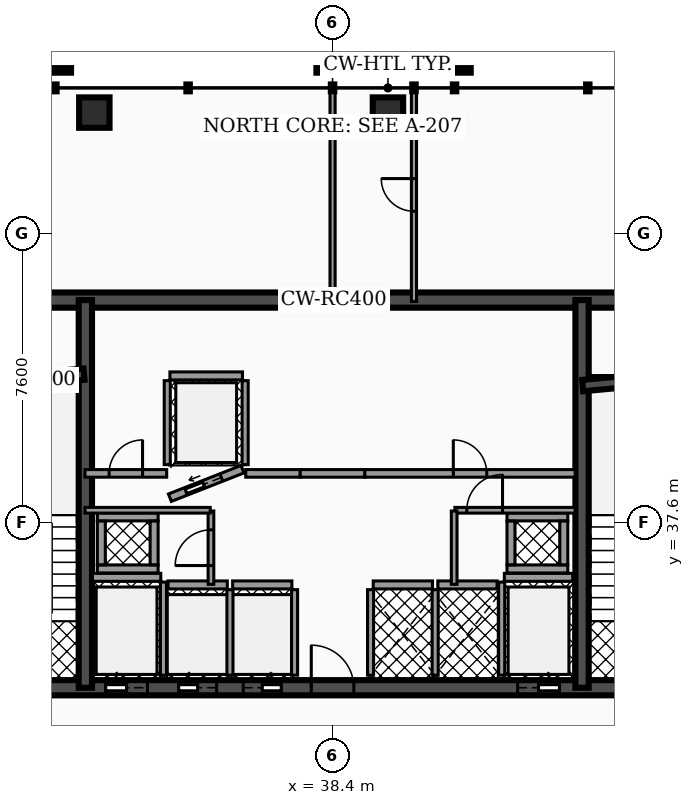
"""IFC4 building model, lengths in metres.
Left out: names, types, materials, properties, quantities, classifications, styles, units other than length and angle.
Written with IfcOpenShell. Run it as: python <this file> out.ifc"""

import sys

from ifc_helpers import new_model, si_unit, direction, frame, frame_2d, origin, origin_2d, place, context, subcontext, project, spatial, rectangle, hollow_rectangle, extrude, element, fill, save


model = new_model("IFC4")
c1 = context("Model", 3, precision=1e-05, world=origin(), true_north=direction((0.0, 1.0)))
c2 = subcontext(c1, "Body", "Model", "MODEL_VIEW")
j1 = project(units=[si_unit("LENGTHUNIT", "METRE"), si_unit("PLANEANGLEUNIT", "RADIAN")], contexts=[c1])
p1 = place(None, origin())
s1 = spatial("IfcSite", under=j1, at=p1, CompositionType="ELEMENT")
p2 = place(p1, origin())
s2 = spatial("IfcBuilding", under=s1, at=p2, CompositionType="ELEMENT")
p3 = place(p2, frame((0.0, 0.0, 145.86)))
s3 = spatial("IfcBuildingStorey", under=s2, at=p3, CompositionType="ELEMENT", Elevation=145.86)
p4 = place(p3, frame((28.4, 43.45, 0.0), z_axis=(0.0, 0.0, 1.0), x_axis=(1.0, 0.0, 0.0)))
e1 = element("IfcWall", 1, at=p4, inside=s3, PredefinedType="SHEAR", context=c2, shape_type="SweptSolid", body=[
    extrude(rectangle(XDim=20.06, YDim=0.4, at=frame_2d((10.03, 0.0))), origin(), (0.0, 0.0, 1.0), 3.5),
])
p5 = place(p3, frame((28.4, 33.25, 0.0), z_axis=(0.0, 0.0, 1.0), x_axis=(1.0, 0.0, 0.0)))
e2 = element("IfcWall", 2, at=p5, inside=s3, PredefinedType="SHEAR", context=c2, shape_type="SweptSolid", body=[
    extrude(rectangle(XDim=20.06, YDim=0.4, at=frame_2d((10.03, 0.0))), origin(), (0.0, 0.0, 1.0), 3.5),
])
p6 = place(p5, frame((4.03, 0.0, 0.0)))
e3 = element("IfcOpeningElement", 3, at=p6, cuts=e2, PredefinedType="OPENING", context=c2, shape_type="SweptSolid", body=[
    extrude(rectangle(XDim=1.1, YDim=2.15, at=frame_2d((0.55, 1.075))), frame((0.0, 0.21, 0.0), z_axis=(0.0, -1.0, 0.0), x_axis=(1.0, 0.0, 0.0)), (0.0, 0.0, 1.0), 0.42),
])
p7 = place(p5, frame((14.87, 0.0, 0.0)))
e4 = element("IfcOpeningElement", 4, at=p7, cuts=e2, PredefinedType="OPENING", context=c2, shape_type="SweptSolid", body=[
    extrude(rectangle(XDim=1.1, YDim=2.15, at=frame_2d((0.55, 1.075))), frame((0.0, 0.21, 0.0), z_axis=(0.0, -1.0, 0.0), x_axis=(1.0, 0.0, 0.0)), (0.0, 0.0, 1.0), 0.42),
])
p8 = place(p5, frame((5.95, 0.0, 0.0)))
e5 = element("IfcOpeningElement", 5, at=p8, cuts=e2, PredefinedType="OPENING", context=c2, shape_type="SweptSolid", body=[
    extrude(rectangle(XDim=1.0, YDim=2.1, at=frame_2d((0.5, 1.05))), frame((0.0, 0.21, 0.0), z_axis=(0.0, -1.0, 0.0), x_axis=(1.0, 0.0, 0.0)), (0.0, 0.0, 1.0), 0.42),
])
p9 = place(p5, frame((7.65, 0.0, 0.0)))
e6 = element("IfcOpeningElement", 6, at=p9, cuts=e2, PredefinedType="OPENING", context=c2, shape_type="SweptSolid", body=[
    extrude(rectangle(XDim=1.0, YDim=2.1, at=frame_2d((0.5, 1.05))), frame((0.0, 0.21, 0.0), z_axis=(0.0, -1.0, 0.0), x_axis=(1.0, 0.0, 0.0)), (0.0, 0.0, 1.0), 0.42),
])
p10 = place(p5, frame((1.31, 0.0, 0.0)))
e7 = element("IfcOpeningElement", 7, at=p10, cuts=e2, PredefinedType="OPENING", context=c2, shape_type="SweptSolid", body=[
    extrude(rectangle(XDim=1.1, YDim=2.2, at=frame_2d((0.55, 1.1))), frame((0.0, 0.21, 0.0), z_axis=(0.0, -1.0, 0.0), x_axis=(1.0, 0.0, 0.0)), (0.0, 0.0, 1.0), 0.42),
])
p11 = place(p5, frame((9.44, 0.0, 0.0)))
e8 = element("IfcOpeningElement", 8, at=p11, cuts=e2, PredefinedType="OPENING", context=c2, shape_type="SweptSolid", body=[
    extrude(rectangle(XDim=1.12, YDim=2.05, at=frame_2d((0.56, 1.025))), frame((0.0, 0.21, 0.0), z_axis=(0.0, -1.0, 0.0), x_axis=(1.0, 0.0, 0.0)), (0.0, 0.0, 1.0), 0.42),
])
p12 = place(p5, frame((17.65, 0.0, 0.0)))
e9 = element("IfcOpeningElement", 9, at=p12, cuts=e2, PredefinedType="OPENING", context=c2, shape_type="SweptSolid", body=[
    extrude(rectangle(XDim=1.1, YDim=2.2, at=frame_2d((0.55, 1.1))), frame((0.0, 0.21, 0.0), z_axis=(0.0, -1.0, 0.0), x_axis=(1.0, 0.0, 0.0)), (0.0, 0.0, 1.0), 0.42),
])
for number, where, z_axis, x_axis in (
    (10, (31.895, 33.25, 0.0), (0.0, 0.0, 1.0), (0.0, 1.0, 0.0)),
    (11, (44.965, 33.25, 0.0), (0.0, 0.0, 1.0), (0.0, 1.0, 0.0)),
):
    element("IfcWall", number, at=place(p3, frame(where, z_axis=z_axis, x_axis=x_axis)), inside=s3, PredefinedType="SHEAR", context=c2, shape_type="SweptSolid", body=[
        extrude(rectangle(XDim=10.2, YDim=0.35, at=frame_2d((5.1, 0.0))), origin(), (0.0, 0.0, 1.0), 3.5),
    ])
p13 = place(p3, frame((28.64, 41.2, 0.0), z_axis=(0.0, 0.0, 1.0), x_axis=(0.995687118776, 0.092774789157, 0.0)))
e12 = element("IfcWall", 12, at=p13, inside=s3, PredefinedType="SHEAR", context=c2, shape_type="SweptSolid", body=[
    extrude(rectangle(XDim=3.234, YDim=0.3, at=frame_2d((1.617, 0.0))), origin(), (0.0, 0.0, 1.0), 3.5),
])
p14 = place(p3, frame((44.98, 41.2, 0.0), z_axis=(0.0, 0.0, 1.0), x_axis=(0.995686468965, 0.09278176286, 0.0)))
e13 = element("IfcWall", 13, at=p14, inside=s3, PredefinedType="SHEAR", context=c2, shape_type="SweptSolid", body=[
    extrude(rectangle(XDim=3.234, YDim=0.3, at=frame_2d((1.617, 0.0))), origin(), (0.0, 0.0, 1.0), 3.5),
])
for number, where, z_axis, x_axis in (
    (14, (39.857, 48.383, 0.0), (0.0, 0.0, 1.0), (1.0, 0.0, 0.0)),
    (15, (32.131, 48.383, 0.0), (0.0, 0.0, 1.0), (1.0, 0.0, 0.0)),
):
    element("IfcColumn", number, at=place(p3, frame(where, z_axis=z_axis, x_axis=x_axis)), inside=s3, PredefinedType="COLUMN", context=c2, shape_type="SweptSolid", body=[
        extrude(hollow_rectangle(XDim=0.8, YDim=0.8, WallThickness=0.04, at=origin_2d()), origin(), (0.0, 0.0, 1.0), 3.5),
    ])
p15 = place(p3, frame((32.08, 36.155, 0.0), z_axis=(0.0, 0.0, 1.0), x_axis=(1.0, 0.0, 0.0)))
e16 = element("IfcWall", 16, at=p15, inside=s3, PredefinedType="SOLIDWALL", context=c2, shape_type="SweptSolid", body=[
    extrude(rectangle(XDim=1.8, YDim=0.21, at=frame_2d((0.9, 0.0))), origin(), (0.0, 0.0, 1.0), 2.472),
])
p16 = place(p3, frame((33.95, 33.58, 0.0), z_axis=(0.0, 0.0, 1.0), x_axis=(0.0, 1.0, 0.0)))
e17 = element("IfcWall", 17, at=p16, inside=s3, PredefinedType="SOLIDWALL", context=c2, shape_type="SweptSolid", body=[
    extrude(rectangle(XDim=2.45, YDim=0.16, at=frame_2d((1.225, 0.0))), origin(), (0.0, 0.0, 1.0), 2.472),
])
p17 = place(p3, frame((42.92, 36.155, 0.0), z_axis=(0.0, 0.0, 1.0), x_axis=(1.0, 0.0, 0.0)))
e18 = element("IfcWall", 18, at=p17, inside=s3, PredefinedType="SOLIDWALL", context=c2, shape_type="SweptSolid", body=[
    extrude(rectangle(XDim=1.8, YDim=0.21, at=frame_2d((0.9, 0.0))), origin(), (0.0, 0.0, 1.0), 2.472),
])
p18 = place(p3, frame((42.85, 33.58, 0.0), z_axis=(0.0, 0.0, 1.0), x_axis=(0.0, 1.0, 0.0)))
e19 = element("IfcWall", 19, at=p18, inside=s3, PredefinedType="SOLIDWALL", context=c2, shape_type="SweptSolid", body=[
    extrude(rectangle(XDim=2.45, YDim=0.16, at=frame_2d((1.225, 0.0))), origin(), (0.0, 0.0, 1.0), 2.472),
])
p19 = place(p3, frame((34.07, 35.955, 0.0), z_axis=(0.0, 0.0, 1.0), x_axis=(1.0, 0.0, 0.0)))
e20 = element("IfcWall", 20, at=p19, inside=s3, PredefinedType="SOLIDWALL", context=c2, shape_type="SweptSolid", body=[
    extrude(rectangle(XDim=1.56, YDim=0.21, at=frame_2d((0.78, 0.0))), origin(), (0.0, 0.0, 1.0), 2.472),
])
p20 = place(p3, frame((35.7, 33.58, 0.0), z_axis=(0.0, 0.0, 1.0), x_axis=(0.0, 1.0, 0.0)))
e21 = element("IfcWall", 21, at=p20, inside=s3, PredefinedType="SOLIDWALL", context=c2, shape_type="SweptSolid", body=[
    extrude(rectangle(XDim=2.25, YDim=0.16, at=frame_2d((1.125, 0.0))), origin(), (0.0, 0.0, 1.0), 2.472),
])
p21 = place(p3, frame((35.77, 35.955, 0.0), z_axis=(0.0, 0.0, 1.0), x_axis=(1.0, 0.0, 0.0)))
e22 = element("IfcWall", 22, at=p21, inside=s3, PredefinedType="SOLIDWALL", context=c2, shape_type="SweptSolid", body=[
    extrude(rectangle(XDim=1.56, YDim=0.21, at=frame_2d((0.78, 0.0))), origin(), (0.0, 0.0, 1.0), 2.472),
])
p22 = place(p3, frame((37.4, 33.58, 0.0), z_axis=(0.0, 0.0, 1.0), x_axis=(0.0, 1.0, 0.0)))
e23 = element("IfcWall", 23, at=p22, inside=s3, PredefinedType="SOLIDWALL", context=c2, shape_type="SweptSolid", body=[
    extrude(rectangle(XDim=2.25, YDim=0.16, at=frame_2d((1.125, 0.0))), origin(), (0.0, 0.0, 1.0), 2.472),
])
p23 = place(p3, frame((34.12, 38.25, 0.0), z_axis=(0.0, 0.0, 1.0), x_axis=(0.930804993012, 0.36551616241, 0.0)))
e24 = element("IfcWall", 24, at=p23, inside=s3, PredefinedType="SOLIDWALL", context=c2, shape_type="SweptSolid", body=[
    extrude(rectangle(XDim=2.052, YDim=0.21, at=frame_2d((1.026, 0.0))), origin(), (0.0, 0.0, 1.0), 2.472),
])
p24 = place(p23, frame((0.455, 0.0, 0.0)))
e25 = element("IfcOpeningElement", 25, at=p24, cuts=e24, PredefinedType="OPENING", context=c2, shape_type="SweptSolid", body=[
    extrude(rectangle(XDim=1.0, YDim=2.1, at=frame_2d((0.5, 1.05))), frame((0.0, 0.115, 0.0), z_axis=(0.0, -1.0, 0.0), x_axis=(1.0, 0.0, 0.0)), (0.0, 0.0, 1.0), 0.23),
])
p25 = place(p3, frame((34.12, 41.455, 0.0), z_axis=(0.0, 0.0, 1.0), x_axis=(1.0, 0.0, 0.0)))
e26 = element("IfcWall", 26, at=p25, inside=s3, PredefinedType="SOLIDWALL", context=c2, shape_type="SweptSolid", body=[
    extrude(rectangle(XDim=1.91, YDim=0.21, at=frame_2d((0.955, 0.0))), origin(), (0.0, 0.0, 1.0), 2.472),
])
for number, where, z_axis, x_axis in (
    (27, (34.05, 39.12, 0.0), (0.0, 0.0, 1.0), (0.0, 1.0, 0.0)),
    (28, (36.1, 39.12, 0.0), (0.0, 0.0, 1.0), (0.0, 1.0, 0.0)),
):
    element("IfcWall", number, at=place(p3, frame(where, z_axis=z_axis, x_axis=x_axis)), inside=s3, PredefinedType="SOLIDWALL", context=c2, shape_type="SweptSolid", body=[
        extrude(rectangle(XDim=2.21, YDim=0.16, at=frame_2d((1.105, 0.0))), origin(), (0.0, 0.0, 1.0), 2.472),
    ])
p26 = place(p3, frame((39.47, 35.955, 0.0), z_axis=(0.0, 0.0, 1.0), x_axis=(1.0, 0.0, 0.0)))
e29 = element("IfcWall", 29, at=p26, inside=s3, PredefinedType="SOLIDWALL", context=c2, shape_type="SweptSolid", body=[
    extrude(rectangle(XDim=1.56, YDim=0.21, at=frame_2d((0.78, 0.0))), origin(), (0.0, 0.0, 1.0), 2.472),
])
for number, where, z_axis, x_axis in (
    (30, (39.4, 33.58, 0.0), (0.0, 0.0, 1.0), (0.0, 1.0, 0.0)),
    (31, (41.1, 33.58, 0.0), (0.0, 0.0, 1.0), (0.0, 1.0, 0.0)),
):
    element("IfcWall", number, at=place(p3, frame(where, z_axis=z_axis, x_axis=x_axis)), inside=s3, PredefinedType="SOLIDWALL", context=c2, shape_type="SweptSolid", body=[
        extrude(rectangle(XDim=2.25, YDim=0.16, at=frame_2d((1.125, 0.0))), origin(), (0.0, 0.0, 1.0), 2.472),
    ])
p27 = place(p3, frame((41.17, 35.955, 0.0), z_axis=(0.0, 0.0, 1.0), x_axis=(1.0, 0.0, 0.0)))
e32 = element("IfcWall", 32, at=p27, inside=s3, PredefinedType="SOLIDWALL", context=c2, shape_type="SweptSolid", body=[
    extrude(rectangle(XDim=1.56, YDim=0.21, at=frame_2d((0.78, 0.0))), origin(), (0.0, 0.0, 1.0), 2.472),
])
for number, where, z_axis, x_axis in (
    (33, (32.21, 36.375, 0.0), (0.0, 0.0, 1.0), (1.0, 0.0, 0.0)),
    (34, (32.21, 37.745, 0.0), (0.0, 0.0, 1.0), (1.0, 0.0, 0.0)),
):
    element("IfcWall", number, at=place(p3, frame(where, z_axis=z_axis, x_axis=x_axis)), inside=s3, PredefinedType="SOLIDWALL", context=c2, shape_type="SweptSolid", body=[
        extrude(rectangle(XDim=1.6, YDim=0.21, at=frame_2d((0.8, 0.0))), origin(), (0.0, 0.0, 1.0), 3.5),
    ])
for number, where, z_axis, x_axis in (
    (35, (32.315, 36.485, 0.0), (0.0, 0.0, 1.0), (0.0, 1.0, 0.0)),
    (36, (33.705, 36.485, 0.0), (0.0, 0.0, 1.0), (0.0, 1.0, 0.0)),
):
    element("IfcWall", number, at=place(p3, frame(where, z_axis=z_axis, x_axis=x_axis)), inside=s3, PredefinedType="SOLIDWALL", context=c2, shape_type="SweptSolid", body=[
        extrude(rectangle(XDim=1.15, YDim=0.21, at=frame_2d((0.575, 0.0))), origin(), (0.0, 0.0, 1.0), 3.5),
    ])
for number, where, z_axis, x_axis in (
    (37, (42.99, 36.375, 0.0), (0.0, 0.0, 1.0), (1.0, 0.0, 0.0)),
    (38, (42.99, 37.745, 0.0), (0.0, 0.0, 1.0), (1.0, 0.0, 0.0)),
):
    element("IfcWall", number, at=place(p3, frame(where, z_axis=z_axis, x_axis=x_axis)), inside=s3, PredefinedType="SOLIDWALL", context=c2, shape_type="SweptSolid", body=[
        extrude(rectangle(XDim=1.6, YDim=0.21, at=frame_2d((0.8, 0.0))), origin(), (0.0, 0.0, 1.0), 3.5),
    ])
for number, where, z_axis, x_axis in (
    (39, (43.095, 36.485, 0.0), (0.0, 0.0, 1.0), (0.0, 1.0, 0.0)),
    (40, (44.485, 36.485, 0.0), (0.0, 0.0, 1.0), (0.0, 1.0, 0.0)),
):
    element("IfcWall", number, at=place(p3, frame(where, z_axis=z_axis, x_axis=x_axis)), inside=s3, PredefinedType="SOLIDWALL", context=c2, shape_type="SweptSolid", body=[
        extrude(rectangle(XDim=1.15, YDim=0.21, at=frame_2d((0.575, 0.0))), origin(), (0.0, 0.0, 1.0), 3.5),
    ])
p28 = place(p3, frame((35.2, 35.97, 0.0), z_axis=(0.0, 0.0, 1.0), x_axis=(0.0, 1.0, 0.0)))
e41 = element("IfcWall", 41, at=p28, inside=s3, PredefinedType="PARTITIONING", context=c2, shape_type="SweptSolid", body=[
    extrude(rectangle(XDim=1.93, YDim=0.15, at=frame_2d((0.965, 0.0))), origin(), (0.0, 0.0, 1.0), 2.457),
])
p29 = place(p28, frame((0.495, 0.0, 0.0)))
e42 = element("IfcOpeningElement", 42, at=p29, cuts=e41, PredefinedType="OPENING", context=c2, shape_type="SweptSolid", body=[
    extrude(rectangle(XDim=0.94, YDim=2.05, at=frame_2d((0.47, 1.025))), frame((0.0, 0.085, 0.0), z_axis=(0.0, -1.0, 0.0), x_axis=(1.0, 0.0, 0.0)), (0.0, 0.0, 1.0), 0.17),
])
p30 = place(p3, frame((31.885, 37.92, 0.0), z_axis=(0.0, 0.0, 1.0), x_axis=(1.0, 0.0, 0.0)))
e43 = element("IfcWall", 43, at=p30, inside=s3, PredefinedType="PARTITIONING", context=c2, shape_type="SweptSolid", body=[
    extrude(rectangle(XDim=3.295, YDim=0.15, at=frame_2d((1.647, 0.0))), origin(), (0.0, 0.0, 1.0), 2.457),
])
p31 = place(p3, frame((31.885, 38.89, 0.0), z_axis=(0.0, 0.0, 1.0), x_axis=(1.0, 0.0, 0.0)))
e44 = element("IfcWall", 44, at=p31, inside=s3, PredefinedType="PARTITIONING", context=c2, shape_type="SweptSolid", body=[
    extrude(rectangle(XDim=2.15, YDim=0.2, at=frame_2d((1.075, 0.0))), origin(), (0.0, 0.0, 1.0), 2.457),
])
p32 = place(p31, frame((0.635, 0.0, 0.0)))
e45 = element("IfcOpeningElement", 45, at=p32, cuts=e44, PredefinedType="OPENING", context=c2, shape_type="SweptSolid", body=[
    extrude(rectangle(XDim=0.88, YDim=2.05, at=frame_2d((0.44, 1.025))), frame((0.0, 0.11, 0.0), z_axis=(0.0, -1.0, 0.0), x_axis=(1.0, 0.0, 0.0)), (0.0, 0.0, 1.0), 0.22),
])
p33 = place(p3, frame((36.115, 38.89, 0.0), z_axis=(0.0, 0.0, 1.0), x_axis=(1.0, 0.0, 0.0)))
e46 = element("IfcWall", 46, at=p33, inside=s3, PredefinedType="PARTITIONING", context=c2, shape_type="SweptSolid", body=[
    extrude(rectangle(XDim=1.435, YDim=0.2, at=frame_2d((0.718, 0.0))), origin(), (0.0, 0.0, 1.0), 2.457),
])
p34 = place(p3, frame((37.55, 38.89, 0.0), z_axis=(0.0, 0.0, 1.0), x_axis=(1.0, 0.0, 0.0)))
e47 = element("IfcWall", 47, at=p34, inside=s3, PredefinedType="PARTITIONING", context=c2, shape_type="SweptSolid", body=[
    extrude(rectangle(XDim=1.7, YDim=0.2, at=frame_2d((0.85, 0.0))), origin(), (0.0, 0.0, 1.0), 2.457),
])
p35 = place(p3, frame((39.25, 38.89, 0.0), z_axis=(0.0, 0.0, 1.0), x_axis=(1.0, 0.0, 0.0)))
e48 = element("IfcWall", 48, at=p35, inside=s3, PredefinedType="PARTITIONING", context=c2, shape_type="SweptSolid", body=[
    extrude(rectangle(XDim=5.535, YDim=0.2, at=frame_2d((2.768, 0.0))), origin(), (0.0, 0.0, 1.0), 2.457),
])
p36 = place(p35, frame((2.327, 0.0, 0.0)))
e49 = element("IfcOpeningElement", 49, at=p36, cuts=e48, PredefinedType="OPENING", context=c2, shape_type="SweptSolid", body=[
    extrude(rectangle(XDim=0.88, YDim=2.05, at=frame_2d((0.44, 1.025))), frame((0.0, 0.11, 0.0), z_axis=(0.0, -1.0, 0.0), x_axis=(1.0, 0.0, 0.0)), (0.0, 0.0, 1.0), 0.22),
])
p37 = place(p3, frame((41.62, 37.92, 0.0), z_axis=(0.0, 0.0, 1.0), x_axis=(1.0, 0.0, 0.0)))
e50 = element("IfcWall", 50, at=p37, inside=s3, PredefinedType="PARTITIONING", context=c2, shape_type="SweptSolid", body=[
    extrude(rectangle(XDim=3.165, YDim=0.15, at=frame_2d((1.583, 0.0))), origin(), (0.0, 0.0, 1.0), 2.457),
])
p38 = place(p37, frame((0.312, 0.0, 0.0)))
e51 = element("IfcOpeningElement", 51, at=p38, cuts=e50, PredefinedType="OPENING", context=c2, shape_type="SweptSolid", body=[
    extrude(rectangle(XDim=0.94, YDim=2.05, at=frame_2d((0.47, 1.025))), frame((0.0, 0.085, 0.0), z_axis=(0.0, -1.0, 0.0), x_axis=(1.0, 0.0, 0.0)), (0.0, 0.0, 1.0), 0.17),
])
p39 = place(p3, frame((41.6, 35.97, 0.0), z_axis=(0.0, 0.0, 1.0), x_axis=(0.0, 1.0, 0.0)))
e52 = element("IfcWall", 52, at=p39, inside=s3, PredefinedType="PARTITIONING", context=c2, shape_type="SweptSolid", body=[
    extrude(rectangle(XDim=1.93, YDim=0.15, at=frame_2d((0.965, 0.0))), origin(), (0.0, 0.0, 1.0), 2.457),
])
p40 = place(p3, frame((38.4, 43.415, 0.0), z_axis=(0.0, 0.0, 1.0), x_axis=(0.0, 1.0, 0.0)))
e53 = element("IfcWall", 53, at=p40, inside=s3, PredefinedType="PARTITIONING", context=c2, shape_type="SweptSolid", body=[
    extrude(rectangle(XDim=5.603, YDim=0.135, at=frame_2d((2.802, 0.0))), origin(), (0.0, 0.0, 1.0), 2.457),
])
p41 = place(p3, frame((40.542, 43.415, 0.0), z_axis=(0.0, 0.0, 1.0), x_axis=(0.0, 1.0, 0.0)))
e54 = element("IfcWall", 54, at=p41, inside=s3, PredefinedType="PARTITIONING", context=c2, shape_type="SweptSolid", body=[
    extrude(rectangle(XDim=5.603, YDim=0.135, at=frame_2d((2.802, 0.0))), origin(), (0.0, 0.0, 1.0), 2.457),
])
p42 = place(p41, frame((2.372, 0.0, 0.0)))
e55 = element("IfcOpeningElement", 55, at=p42, cuts=e54, PredefinedType="OPENING", context=c2, shape_type="SweptSolid", body=[
    extrude(rectangle(XDim=0.86, YDim=2.05, at=frame_2d((0.43, 1.025))), frame((0.0, 0.077, 0.0), z_axis=(0.0, -1.0, 0.0), x_axis=(1.0, 0.0, 0.0)), (0.0, 0.0, 1.0), 0.155),
])
p43 = place(p6, origin())
e56 = element("IfcDoor", 56, at=p43, inside=s3, OperationType="SLIDING_TO_LEFT", PredefinedType="DOOR", context=c2, shape_type="SweptSolid", body=[
    extrude(rectangle(XDim=1.1, YDim=2.15, at=frame_2d((0.55, 1.075))), frame((0.0, 0.025, 0.0), z_axis=(0.0, -1.0, 0.0), x_axis=(1.0, 0.0, 0.0)), (0.0, 0.0, 1.0), 0.05),
])
fill(e3, e56)
p44 = place(p7, origin())
e57 = element("IfcDoor", 57, at=p44, inside=s3, OperationType="SLIDING_TO_RIGHT", PredefinedType="DOOR", context=c2, shape_type="SweptSolid", body=[
    extrude(rectangle(XDim=1.1, YDim=2.15, at=frame_2d((0.55, 1.075))), frame((0.0, 0.025, 0.0), z_axis=(0.0, -1.0, 0.0), x_axis=(1.0, 0.0, 0.0)), (0.0, 0.0, 1.0), 0.05),
])
fill(e4, e57)
p45 = place(p8, origin())
e58 = element("IfcDoor", 58, at=p45, inside=s3, OperationType="SLIDING_TO_LEFT", PredefinedType="DOOR", context=c2, shape_type="SweptSolid", body=[
    extrude(rectangle(XDim=1.0, YDim=2.1, at=frame_2d((0.5, 1.05))), frame((0.0, 0.025, 0.0), z_axis=(0.0, -1.0, 0.0), x_axis=(1.0, 0.0, 0.0)), (0.0, 0.0, 1.0), 0.05),
])
fill(e5, e58)
p46 = place(p9, origin())
e59 = element("IfcDoor", 59, at=p46, inside=s3, OperationType="SLIDING_TO_RIGHT", PredefinedType="DOOR", context=c2, shape_type="SweptSolid", body=[
    extrude(rectangle(XDim=1.0, YDim=2.1, at=frame_2d((0.5, 1.05))), frame((0.0, 0.025, 0.0), z_axis=(0.0, -1.0, 0.0), x_axis=(1.0, 0.0, 0.0)), (0.0, 0.0, 1.0), 0.05),
])
fill(e6, e59)
p47 = place(p24, origin())
e60 = element("IfcDoor", 60, at=p47, inside=s3, OperationType="SLIDING_TO_LEFT", PredefinedType="DOOR", context=c2, shape_type="SweptSolid", body=[
    extrude(rectangle(XDim=1.0, YDim=2.1, at=frame_2d((0.5, 1.05))), frame((0.0, 0.025, 0.0), z_axis=(0.0, -1.0, 0.0), x_axis=(1.0, 0.0, 0.0)), (0.0, 0.0, 1.0), 0.05),
])
fill(e25, e60)
p48 = place(p11, origin())
e61 = element("IfcDoor", 61, at=p48, inside=s3, OperationType="SINGLE_SWING_LEFT", PredefinedType="DOOR", context=c2, shape_type="SweptSolid", body=[
    extrude(rectangle(XDim=1.12, YDim=2.05, at=frame_2d((0.56, 1.025))), frame((0.0, 0.025, 0.0), z_axis=(0.0, -1.0, 0.0), x_axis=(1.0, 0.0, 0.0)), (0.0, 0.0, 1.0), 0.05),
])
fill(e8, e61)
p49 = place(p29, origin())
e62 = element("IfcDoor", 62, at=p49, inside=s3, OperationType="SINGLE_SWING_LEFT", PredefinedType="DOOR", context=c2, shape_type="SweptSolid", body=[
    extrude(rectangle(XDim=0.94, YDim=2.05, at=frame_2d((0.47, 1.025))), frame((0.0, 0.025, 0.0), z_axis=(0.0, -1.0, 0.0), x_axis=(1.0, 0.0, 0.0)), (0.0, 0.0, 1.0), 0.05),
])
fill(e42, e62)
p50 = place(p32, origin())
e63 = element("IfcDoor", 63, at=p50, inside=s3, OperationType="SINGLE_SWING_RIGHT", PredefinedType="DOOR", context=c2, shape_type="SweptSolid", body=[
    extrude(rectangle(XDim=0.88, YDim=2.05, at=frame_2d((0.44, 1.025))), frame((0.0, 0.025, 0.0), z_axis=(0.0, -1.0, 0.0), x_axis=(1.0, 0.0, 0.0)), (0.0, 0.0, 1.0), 0.05),
])
fill(e45, e63)
p51 = place(p36, origin())
e64 = element("IfcDoor", 64, at=p51, inside=s3, OperationType="SINGLE_SWING_LEFT", PredefinedType="DOOR", context=c2, shape_type="SweptSolid", body=[
    extrude(rectangle(XDim=0.88, YDim=2.05, at=frame_2d((0.44, 1.025))), frame((0.0, 0.025, 0.0), z_axis=(0.0, -1.0, 0.0), x_axis=(1.0, 0.0, 0.0)), (0.0, 0.0, 1.0), 0.05),
])
fill(e49, e64)
p52 = place(p38, origin())
e65 = element("IfcDoor", 65, at=p52, inside=s3, OperationType="SINGLE_SWING_RIGHT", PredefinedType="DOOR", context=c2, shape_type="SweptSolid", body=[
    extrude(rectangle(XDim=0.94, YDim=2.05, at=frame_2d((0.47, 1.025))), frame((0.0, 0.025, 0.0), z_axis=(0.0, -1.0, 0.0), x_axis=(1.0, 0.0, 0.0)), (0.0, 0.0, 1.0), 0.05),
])
fill(e51, e65)
p53 = place(p42, origin())
e66 = element("IfcDoor", 66, at=p53, inside=s3, OperationType="SINGLE_SWING_RIGHT", PredefinedType="DOOR", context=c2, shape_type="SweptSolid", body=[
    extrude(rectangle(XDim=0.86, YDim=2.05, at=frame_2d((0.43, 1.025))), frame((0.0, 0.025, 0.0), z_axis=(0.0, -1.0, 0.0), x_axis=(1.0, 0.0, 0.0)), (0.0, 0.0, 1.0), 0.05),
])
fill(e55, e66)
save(model, sys.argv[1])
